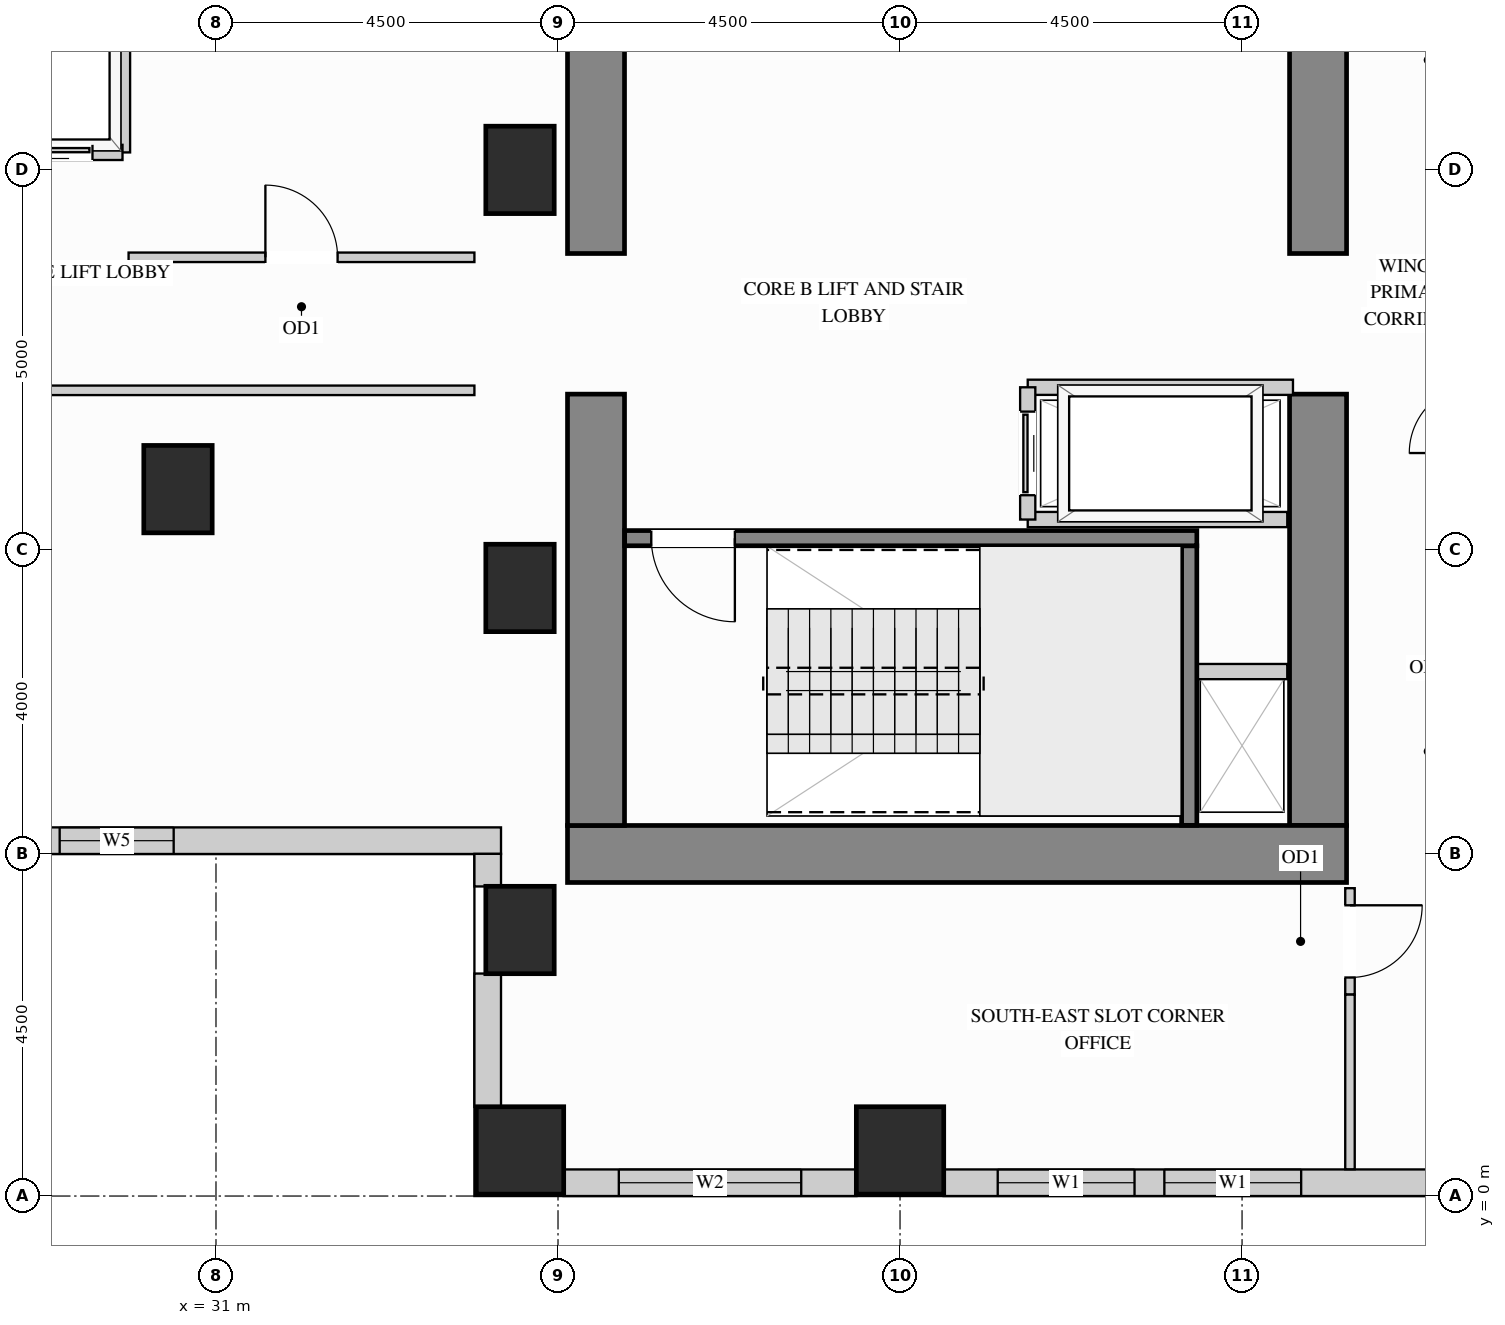
"""IFC4 building model, lengths in metres.
Left out: names, types, materials, properties, quantities, classifications, styles, units other than length and angle.
Written with IfcOpenShell. Run it as: python <this file> out.ifc"""

import sys

from ifc_helpers import new_model, si_unit, direction, frame, frame_2d, origin, origin_2d, place, context, subcontext, project, spatial, rectangle, extrude, source, transform, mapped, element, fill, save


model = new_model("IFC4")
c1 = context("Model", 3, precision=1e-05, world=origin(), true_north=direction((0.0, 1.0)))
c2 = subcontext(c1, "Body", "Model", "MODEL_VIEW")
j1 = project(units=[si_unit("LENGTHUNIT", "METRE"), si_unit("PLANEANGLEUNIT", "RADIAN")], contexts=[c1])
p1 = place(None, origin())
s1 = spatial("IfcSite", under=j1, at=p1, CompositionType="ELEMENT")
p2 = place(p1, origin())
s2 = spatial("IfcBuilding", under=s1, at=p2, CompositionType="ELEMENT")
p3 = place(p2, frame((0.0, 0.0, 81.0)))
s3 = spatial("IfcBuildingStorey", under=s2, at=p3, CompositionType="ELEMENT", Elevation=81.0)
m1 = source(origin(), c2, "Body", "SweptSolid", [
    extrude(rectangle(XDim=0.9, YDim=1.15, at=origin_2d()), origin(), (0.0, 0.0, 1.0), 3.38),
])
for number, where, z_axis, x_axis in (
    (1, (35.0, 13.5, 0.0), (0.0, 0.0, 1.0), (1.0, 0.0, 0.0)),
    (2, (35.0, 3.5, 0.0), (0.0, 0.0, 1.0), (1.0, 0.0, 0.0)),
    (3, (35.0, 8.0, 0.0), (0.0, 0.0, 1.0), (1.0, 0.0, 0.0)),
    (4, (30.5, 9.3, 0.0), (0.0, 0.0, 1.0), (1.0, 0.0, 0.0)),
):
    element("IfcColumn", number, at=place(p3, frame(where, z_axis=z_axis, x_axis=x_axis)), inside=s3, PredefinedType="COLUMN", context=c2, shape_type="MappedRepresentation", body=[
        mapped(m1, transform((0.0, 0.0, 0.0), x_axis=(1.0, 0.0, 0.0), y_axis=(0.0, 1.0, 0.0), z_axis=(0.0, 0.0, 1.0))),
    ])
m2 = source(origin(), c2, "Body", "SweptSolid", [
    extrude(rectangle(XDim=1.15, YDim=1.15, at=origin_2d()), origin(), (0.0, 0.0, 1.0), 3.38),
])
for number, where, z_axis, x_axis in (
    (5, (35.0, 0.6, 0.0), (0.0, 0.0, 1.0), (1.0, 0.0, 0.0)),
    (6, (40.0, 0.6, 0.0), (0.0, 0.0, 1.0), (1.0, 0.0, 0.0)),
):
    element("IfcColumn", number, at=place(p3, frame(where, z_axis=z_axis, x_axis=x_axis)), inside=s3, PredefinedType="COLUMN", context=c2, shape_type="MappedRepresentation", body=[
        mapped(m2, transform((0.0, 0.0, 0.0), x_axis=(1.0, 0.0, 0.0), y_axis=(0.0, 1.0, 0.0), z_axis=(0.0, 0.0, 1.0))),
    ])
m3 = source(origin(), c2, "Body", "SweptSolid", [
    extrude(rectangle(XDim=5.675, YDim=0.75, at=frame_2d((2.837, 0.0))), origin(), (0.0, 0.0, 1.0), 3.38),
])
p4 = place(p3, frame((45.5, 4.875, 0.0), z_axis=(0.0, 0.0, 1.0), x_axis=(0.0, 1.0, 0.0)))
e7 = element("IfcWall", 7, at=p4, inside=s3, PredefinedType="SHEAR", context=c2, shape_type="MappedRepresentation", body=[
    mapped(m3, transform((0.0, 0.0, 0.0), x_axis=(1.0, 0.0, 0.0), y_axis=(0.0, 1.0, 0.0), z_axis=(0.0, 0.0, 1.0))),
])
m4 = source(origin(), c2, "Body", "SweptSolid", [
    extrude(rectangle(XDim=3.725, YDim=0.75, at=frame_2d((1.863, 0.0))), origin(), (0.0, 0.0, 1.0), 3.38),
])
p5 = place(p3, frame((45.5, 12.4, 0.0), z_axis=(0.0, 0.0, 1.0), x_axis=(0.0, 1.0, 0.0)))
e8 = element("IfcWall", 8, at=p5, inside=s3, PredefinedType="SHEAR", context=c2, shape_type="MappedRepresentation", body=[
    mapped(m4, transform((0.0, 0.0, 0.0), x_axis=(1.0, 0.0, 0.0), y_axis=(0.0, 1.0, 0.0), z_axis=(0.0, 0.0, 1.0))),
])
m5 = source(origin(), c2, "Body", "SweptSolid", [
    extrude(rectangle(XDim=10.25, YDim=0.75, at=frame_2d((5.125, 0.0))), origin(), (0.0, 0.0, 1.0), 3.38),
])
p6 = place(p3, frame((35.625, 4.5, 0.0), z_axis=(0.0, 0.0, 1.0), x_axis=(1.0, 0.0, 0.0)))
e9 = element("IfcWall", 9, at=p6, inside=s3, PredefinedType="SHEAR", context=c2, shape_type="MappedRepresentation", body=[
    mapped(m5, transform((0.0, 0.0, 0.0), x_axis=(1.0, 0.0, 0.0), y_axis=(0.0, 1.0, 0.0), z_axis=(0.0, 0.0, 1.0))),
])
p7 = place(p3, frame((36.0, 4.875, 0.0), z_axis=(0.0, 0.0, 1.0), x_axis=(0.0, 1.0, 0.0)))
e10 = element("IfcWall", 10, at=p7, inside=s3, PredefinedType="SHEAR", context=c2, shape_type="MappedRepresentation", body=[
    mapped(m3, transform((0.0, 0.0, 0.0), x_axis=(1.0, 0.0, 0.0), y_axis=(0.0, 1.0, 0.0), z_axis=(0.0, 0.0, 1.0))),
])
p8 = place(p3, frame((36.0, 12.4, 0.0), z_axis=(0.0, 0.0, 1.0), x_axis=(0.0, 1.0, 0.0)))
e11 = element("IfcWall", 11, at=p8, inside=s3, PredefinedType="SHEAR", context=c2, shape_type="MappedRepresentation", body=[
    mapped(m4, transform((0.0, 0.0, 0.0), x_axis=(1.0, 0.0, 0.0), y_axis=(0.0, 1.0, 0.0), z_axis=(0.0, 0.0, 1.0))),
])
p9 = place(p3, frame((19.15, 4.675, 0.0), z_axis=(0.0, 0.0, 1.0), x_axis=(1.0, 0.0, 0.0)))
e12 = element("IfcWall", 12, at=p9, inside=s3, PredefinedType="SOLIDWALL", context=c2, shape_type="SweptSolid", body=[
    extrude(rectangle(XDim=15.6, YDim=0.35, at=frame_2d((7.8, 0.0))), origin(), (0.0, 0.0, 1.0), 3.365),
])
p10 = place(p9, frame((4.307, 0.0, 0.78)))
e13 = element("IfcOpeningElement", 13, at=p10, cuts=e12, PredefinedType="OPENING", context=c2, shape_type="SweptSolid", body=[
    extrude(rectangle(XDim=1.5, YDim=2.0, at=frame_2d((0.75, 1.0))), frame((0.0, 0.185, 0.0), z_axis=(0.0, -1.0, 0.0), x_axis=(1.0, 0.0, 0.0)), (0.0, 0.0, 1.0), 0.37),
])
p11 = place(p9, frame((9.793, 0.0, 0.78)))
e14 = element("IfcOpeningElement", 14, at=p11, cuts=e12, PredefinedType="OPENING", context=c2, shape_type="SweptSolid", body=[
    extrude(rectangle(XDim=1.5, YDim=2.0, at=frame_2d((0.75, 1.0))), frame((0.0, 0.185, 0.0), z_axis=(0.0, -1.0, 0.0), x_axis=(1.0, 0.0, 0.0)), (0.0, 0.0, 1.0), 0.37),
])
m6 = source(origin(), c2, "Body", "SweptSolid", [
    extrude(rectangle(XDim=0.429, YDim=0.35, at=frame_2d((0.214, 0.0))), origin(), (0.0, 0.0, 1.0), 3.365),
])
p12 = place(p3, frame((34.575, 4.502, 0.0), z_axis=(0.0, 0.0, 1.0), x_axis=(0.0, -1.0, 0.0)))
e15 = element("IfcWall", 15, at=p12, inside=s3, PredefinedType="SOLIDWALL", context=c2, shape_type="MappedRepresentation", body=[
    mapped(m6, transform((0.0, 0.0, 0.0), x_axis=(1.0, 0.0, 0.0), y_axis=(0.0, 1.0, 0.0), z_axis=(0.0, 0.0, 1.0))),
])
m7 = source(origin(), c2, "Body", "SweptSolid", [
    extrude(rectangle(XDim=1.754, YDim=0.35, at=frame_2d((0.877, 0.0))), origin(), (0.0, 0.0, 1.0), 3.365),
])
p13 = place(p3, frame((34.575, 2.927, 0.0), z_axis=(0.0, 0.0, 1.0), x_axis=(0.0, -1.0, 0.0)))
e16 = element("IfcWall", 16, at=p13, inside=s3, PredefinedType="SOLIDWALL", context=c2, shape_type="MappedRepresentation", body=[
    mapped(m7, transform((0.0, 0.0, 0.0), x_axis=(1.0, 0.0, 0.0), y_axis=(0.0, 1.0, 0.0), z_axis=(0.0, 0.0, 1.0))),
])
p14 = place(p3, frame((35.573, 0.175, 0.0), z_axis=(0.0, 0.0, 1.0), x_axis=(1.0, 0.0, 0.0)))
e17 = element("IfcWall", 17, at=p14, inside=s3, PredefinedType="SOLIDWALL", context=c2, shape_type="SweptSolid", body=[
    extrude(rectangle(XDim=3.854, YDim=0.35, at=frame_2d((1.927, 0.0))), origin(), (0.0, 0.0, 1.0), 3.365),
])
p15 = place(p14, frame((0.727, 0.0, 0.78)))
e18 = element("IfcOpeningElement", 18, at=p15, cuts=e17, PredefinedType="OPENING", context=c2, shape_type="SweptSolid", body=[
    extrude(rectangle(XDim=2.4, YDim=2.1, at=frame_2d((1.2, 1.05))), frame((0.0, 0.185, 0.0), z_axis=(0.0, -1.0, 0.0), x_axis=(1.0, 0.0, 0.0)), (0.0, 0.0, 1.0), 0.37),
])
p16 = place(p3, frame((40.573, 0.175, 0.0), z_axis=(0.0, 0.0, 1.0), x_axis=(1.0, 0.0, 0.0)))
e19 = element("IfcWall", 19, at=p16, inside=s3, PredefinedType="SOLIDWALL", context=c2, shape_type="SweptSolid", body=[
    extrude(rectangle(XDim=6.454, YDim=0.35, at=frame_2d((3.227, 0.0))), origin(), (0.0, 0.0, 1.0), 3.365),
])
p17 = place(p16, frame((0.712, 0.0, 0.78)))
e20 = element("IfcOpeningElement", 20, at=p17, cuts=e19, PredefinedType="OPENING", context=c2, shape_type="SweptSolid", body=[
    extrude(rectangle(XDim=1.8, YDim=2.1, at=frame_2d((0.9, 1.05))), frame((0.0, 0.185, 0.0), z_axis=(0.0, -1.0, 0.0), x_axis=(1.0, 0.0, 0.0)), (0.0, 0.0, 1.0), 0.37),
])
p18 = place(p16, frame((2.905, 0.0, 0.78)))
e21 = element("IfcOpeningElement", 21, at=p18, cuts=e19, PredefinedType="OPENING", context=c2, shape_type="SweptSolid", body=[
    extrude(rectangle(XDim=1.8, YDim=2.1, at=frame_2d((0.9, 1.05))), frame((0.0, 0.185, 0.0), z_axis=(0.0, -1.0, 0.0), x_axis=(1.0, 0.0, 0.0)), (0.0, 0.0, 1.0), 0.37),
])
p19 = place(p3, frame((45.92, 2.65, 0.0), z_axis=(0.0, 0.0, 1.0), x_axis=(0.0, 1.0, 0.0)))
e22 = element("IfcWall", 22, at=p19, inside=s3, PredefinedType="PARTITIONING", context=c2, shape_type="SweptSolid", body=[
    extrude(rectangle(XDim=1.4, YDim=0.125, at=frame_2d((0.7, 0.0))), origin(), (0.0, 0.0, 1.0), 3.365),
])
p20 = place(p19, frame((0.225, 0.0, 0.0)))
e23 = element("IfcOpeningElement", 23, at=p20, cuts=e22, PredefinedType="OPENING", context=c2, shape_type="SweptSolid", body=[
    extrude(rectangle(XDim=0.95, YDim=2.15, at=frame_2d((0.475, 1.075))), frame((0.0, 0.073, 0.0), z_axis=(0.0, -1.0, 0.0), x_axis=(1.0, 0.0, 0.0)), (0.0, 0.0, 1.0), 0.145),
])
m8 = source(origin(), c2, "Body", "SweptSolid", [
    extrude(rectangle(XDim=2.298, YDim=0.125, at=frame_2d((1.149, 0.0))), origin(), (0.0, 0.0, 1.0), 3.365),
])
p21 = place(p3, frame((45.92, 0.352, 0.0), z_axis=(0.0, 0.0, 1.0), x_axis=(0.0, 1.0, 0.0)))
e24 = element("IfcWall", 24, at=p21, inside=s3, PredefinedType="PARTITIONING", context=c2, shape_type="MappedRepresentation", body=[
    mapped(m8, transform((0.0, 0.0, 0.0), x_axis=(1.0, 0.0, 0.0), y_axis=(0.0, 1.0, 0.0), z_axis=(0.0, 0.0, 1.0))),
])
p22 = place(p3, frame((29.85, 12.35, 0.0), z_axis=(0.0, 0.0, 1.0), x_axis=(1.0, 0.0, 0.0)))
e25 = element("IfcWall", 25, at=p22, inside=s3, PredefinedType="PARTITIONING", context=c2, shape_type="SweptSolid", body=[
    extrude(rectangle(XDim=4.55, YDim=0.125, at=frame_2d((2.275, 0.0))), origin(), (0.0, 0.0, 1.0), 3.365),
])
p23 = place(p22, frame((1.8, 0.0, 0.0)))
e26 = element("IfcOpeningElement", 26, at=p23, cuts=e25, PredefinedType="OPENING", context=c2, shape_type="SweptSolid", body=[
    extrude(rectangle(XDim=0.95, YDim=2.15, at=frame_2d((0.475, 1.075))), frame((0.0, 0.073, 0.0), z_axis=(0.0, -1.0, 0.0), x_axis=(1.0, 0.0, 0.0)), (0.0, 0.0, 1.0), 0.145),
])
p24 = place(p3, frame((19.5, 10.6, 0.0), z_axis=(0.0, 0.0, 1.0), x_axis=(1.0, 0.0, 0.0)))
e27 = element("IfcWall", 27, at=p24, inside=s3, PredefinedType="PARTITIONING", context=c2, shape_type="SweptSolid", body=[
    extrude(rectangle(XDim=14.9, YDim=0.125, at=frame_2d((7.45, 0.0))), origin(), (0.0, 0.0, 1.0), 3.365),
])
p25 = place(p24, frame((6.975, 0.0, 0.0)))
e28 = element("IfcOpeningElement", 28, at=p25, cuts=e27, PredefinedType="OPENING", context=c2, shape_type="SweptSolid", body=[
    extrude(rectangle(XDim=0.95, YDim=2.15, at=frame_2d((0.475, 1.075))), frame((0.0, 0.073, 0.0), z_axis=(0.0, -1.0, 0.0), x_axis=(1.0, 0.0, 0.0)), (0.0, 0.0, 1.0), 0.145),
])
m9 = source(origin(), c2, "Body", "SweptSolid", [
    extrude(rectangle(XDim=1.245, YDim=0.2, at=frame_2d((0.623, 0.0))), origin(), (0.0, 0.0, 1.0), 3.365),
])
p26 = place(p3, frame((43.85, 6.9, 0.0), z_axis=(0.0, 0.0, 1.0), x_axis=(1.0, 0.0, 0.0)))
e29 = element("IfcWall", 29, at=p26, inside=s3, PredefinedType="PARTITIONING", context=c2, shape_type="MappedRepresentation", body=[
    mapped(m9, transform((0.0, 0.0, 0.0), x_axis=(1.0, 0.0, 0.0), y_axis=(0.0, 1.0, 0.0), z_axis=(0.0, 0.0, 1.0))),
])
m10 = source(origin(), c2, "Body", "SweptSolid", [
    extrude(rectangle(XDim=2.29, YDim=0.2, at=frame_2d((1.145, 0.0))), origin(), (0.0, 0.0, 1.0), 3.365),
])
p27 = place(p3, frame((29.77, 13.73, 0.0), z_axis=(0.0, 0.0, 1.0), x_axis=(0.0, 1.0, 0.0)))
e30 = element("IfcWall", 30, at=p27, inside=s3, PredefinedType="PARTITIONING", context=c2, shape_type="MappedRepresentation", body=[
    mapped(m10, transform((0.0, 0.0, 0.0), x_axis=(1.0, 0.0, 0.0), y_axis=(0.0, 1.0, 0.0), z_axis=(0.0, 0.0, 1.0))),
])
p28 = place(p3, frame((27.88, 13.73, 0.0), z_axis=(0.0, 0.0, 1.0), x_axis=(1.0, 0.0, 0.0)))
e31 = element("IfcWall", 31, at=p28, inside=s3, PredefinedType="PARTITIONING", context=c2, shape_type="SweptSolid", body=[
    extrude(rectangle(XDim=1.89, YDim=0.2, at=frame_2d((0.945, 0.0))), origin(), (0.0, 0.0, 1.0), 2.446),
])
p29 = place(p28, frame((0.395, 0.0, 0.0)))
e32 = element("IfcOpeningElement", 32, at=p29, cuts=e31, PredefinedType="OPENING", context=c2, shape_type="SweptSolid", body=[
    extrude(rectangle(XDim=1.1, YDim=2.2, at=frame_2d((0.55, 1.1))), frame((0.0, 0.11, 0.0), z_axis=(0.0, -1.0, 0.0), x_axis=(1.0, 0.0, 0.0)), (0.0, 0.0, 1.0), 0.22),
])
m11 = source(origin(), c2, "Body", "SweptSolid", [
    extrude(rectangle(XDim=3.49, YDim=0.2, at=frame_2d((1.745, 0.0))), origin(), (0.0, 0.0, 1.0), 3.365),
])
p30 = place(p3, frame((41.68, 10.64, 0.0), z_axis=(0.0, 0.0, 1.0), x_axis=(1.0, 0.0, 0.0)))
e33 = element("IfcWall", 33, at=p30, inside=s3, PredefinedType="PARTITIONING", context=c2, shape_type="MappedRepresentation", body=[
    mapped(m11, transform((0.0, 0.0, 0.0), x_axis=(1.0, 0.0, 0.0), y_axis=(0.0, 1.0, 0.0), z_axis=(0.0, 0.0, 1.0))),
])
m12 = source(origin(), c2, "Body", "SweptSolid", [
    extrude(rectangle(XDim=3.415, YDim=0.2, at=frame_2d((1.708, 0.0))), origin(), (0.0, 0.0, 1.0), 3.365),
])
p31 = place(p3, frame((41.68, 8.9, 0.0), z_axis=(0.0, 0.0, 1.0), x_axis=(1.0, 0.0, 0.0)))
e34 = element("IfcWall", 34, at=p31, inside=s3, PredefinedType="PARTITIONING", context=c2, shape_type="MappedRepresentation", body=[
    mapped(m12, transform((0.0, 0.0, 0.0), x_axis=(1.0, 0.0, 0.0), y_axis=(0.0, 1.0, 0.0), z_axis=(0.0, 0.0, 1.0))),
])
p32 = place(p3, frame((41.68, 8.9, 0.0), z_axis=(0.0, 0.0, 1.0), x_axis=(0.0, 1.0, 0.0)))
e35 = element("IfcWall", 35, at=p32, inside=s3, PredefinedType="PARTITIONING", context=c2, shape_type="SweptSolid", body=[
    extrude(rectangle(XDim=1.74, YDim=0.2, at=frame_2d((0.87, 0.0))), origin(), (0.0, 0.0, 1.0), 3.365),
])
p33 = place(p32, frame((0.32, 0.0, 0.0)))
e36 = element("IfcOpeningElement", 36, at=p33, cuts=e35, PredefinedType="OPENING", context=c2, shape_type="SweptSolid", body=[
    extrude(rectangle(XDim=1.1, YDim=2.2, at=frame_2d((0.55, 1.1))), frame((0.0, 0.11, 0.0), z_axis=(0.0, -1.0, 0.0), x_axis=(1.0, 0.0, 0.0)), (0.0, 0.0, 1.0), 0.22),
])
m13 = source(origin(), c2, "Body", "SweptSolid", [
    extrude(rectangle(XDim=3.678, YDim=0.2, at=frame_2d((1.839, 0.0))), origin(), (0.0, 0.0, 1.0), 3.38),
])
p34 = place(p3, frame((43.805, 4.877, 0.0), z_axis=(0.0, 0.0, 1.0), x_axis=(0.0, 1.0, 0.0)))
e37 = element("IfcWall", 37, at=p34, inside=s3, PredefinedType="SHEAR", context=c2, shape_type="MappedRepresentation", body=[
    mapped(m13, transform((0.0, 0.0, 0.0), x_axis=(1.0, 0.0, 0.0), y_axis=(0.0, 1.0, 0.0), z_axis=(0.0, 0.0, 1.0))),
])
p35 = place(p3, frame((36.377, 8.655, 0.0), z_axis=(0.0, 0.0, 1.0), x_axis=(1.0, 0.0, 0.0)))
e38 = element("IfcWall", 38, at=p35, inside=s3, PredefinedType="SHEAR", context=c2, shape_type="SweptSolid", body=[
    extrude(rectangle(XDim=7.528, YDim=0.2, at=frame_2d((3.764, 0.0))), origin(), (0.0, 0.0, 1.0), 3.38),
])
p36 = place(p35, frame((0.35, 0.0, 0.0)))
e39 = element("IfcOpeningElement", 39, at=p36, cuts=e38, PredefinedType="OPENING", context=c2, shape_type="SweptSolid", body=[
    extrude(rectangle(XDim=1.1, YDim=2.15, at=frame_2d((0.55, 1.075))), frame((0.0, 0.11, 0.0), z_axis=(0.0, -1.0, 0.0), x_axis=(1.0, 0.0, 0.0)), (0.0, 0.0, 1.0), 0.22),
])
m14 = source(origin(), c2, "Body", "SweptSolid", [
    extrude(rectangle(XDim=1.1, YDim=2.2, at=frame_2d((0.55, 1.1))), frame((0.0, 0.025, 0.0), z_axis=(0.0, -1.0, 0.0), x_axis=(1.0, 0.0, 0.0)), (0.0, 0.0, 1.0), 0.05),
])
p37 = place(p29, origin())
e40 = element("IfcDoor", 40, at=p37, inside=s3, OperationType="SLIDING_TO_LEFT", PredefinedType="DOOR", context=c2, shape_type="MappedRepresentation", body=[
    mapped(m14, transform((0.0, 0.0, 0.0), x_axis=(1.0, 0.0, 0.0), y_axis=(0.0, 1.0, 0.0), z_axis=(0.0, 0.0, 1.0))),
])
fill(e32, e40)
p38 = place(p33, origin())
e41 = element("IfcDoor", 41, at=p38, inside=s3, OperationType="SLIDING_TO_LEFT", PredefinedType="DOOR", context=c2, shape_type="MappedRepresentation", body=[
    mapped(m14, transform((0.0, 0.0, 0.0), x_axis=(1.0, 0.0, 0.0), y_axis=(0.0, 1.0, 0.0), z_axis=(0.0, 0.0, 1.0))),
])
fill(e36, e41)
m15 = source(origin(), c2, "Body", "SweptSolid", [
    extrude(rectangle(XDim=0.95, YDim=2.15, at=frame_2d((0.475, 1.075))), frame((0.0, 0.025, 0.0), z_axis=(0.0, -1.0, 0.0), x_axis=(1.0, 0.0, 0.0)), (0.0, 0.0, 1.0), 0.05),
])
p39 = place(p20, origin())
e42 = element("IfcDoor", 42, at=p39, inside=s3, OperationType="SINGLE_SWING_RIGHT", PredefinedType="DOOR", context=c2, shape_type="MappedRepresentation", body=[
    mapped(m15, transform((0.0, 0.0, 0.0), x_axis=(1.0, 0.0, 0.0), y_axis=(0.0, 1.0, 0.0), z_axis=(0.0, 0.0, 1.0))),
])
fill(e23, e42)
p40 = place(p23, origin())
e43 = element("IfcDoor", 43, at=p40, inside=s3, OperationType="SINGLE_SWING_LEFT", PredefinedType="DOOR", context=c2, shape_type="MappedRepresentation", body=[
    mapped(m15, transform((0.0, 0.0, 0.0), x_axis=(1.0, 0.0, 0.0), y_axis=(0.0, 1.0, 0.0), z_axis=(0.0, 0.0, 1.0))),
])
fill(e26, e43)
m16 = source(origin(), c2, "Body", "SweptSolid", [
    extrude(rectangle(XDim=1.1, YDim=2.15, at=frame_2d((0.55, 1.075))), frame((0.0, 0.025, 0.0), z_axis=(0.0, -1.0, 0.0), x_axis=(1.0, 0.0, 0.0)), (0.0, 0.0, 1.0), 0.05),
])
p41 = place(p36, origin())
e44 = element("IfcDoor", 44, at=p41, inside=s3, OperationType="SINGLE_SWING_RIGHT", PredefinedType="DOOR", context=c2, shape_type="MappedRepresentation", body=[
    mapped(m16, transform((0.0, 0.0, 0.0), x_axis=(1.0, 0.0, 0.0), y_axis=(0.0, 1.0, 0.0), z_axis=(0.0, 0.0, 1.0))),
])
fill(e39, e44)
m17 = source(origin(), c2, "Body", "SweptSolid", [
    extrude(rectangle(XDim=1.8, YDim=2.1, at=frame_2d((0.9, 1.05))), frame((0.0, 0.03, 0.0), z_axis=(0.0, -1.0, 0.0), x_axis=(1.0, 0.0, 0.0)), (0.0, 0.0, 1.0), 0.06),
])
p42 = place(p17, origin())
e45 = element("IfcWindow", 45, at=p42, inside=s3, PartitioningType="SINGLE_PANEL", PredefinedType="WINDOW", context=c2, shape_type="MappedRepresentation", body=[
    mapped(m17, transform((0.0, 0.0, 0.0), x_axis=(1.0, 0.0, 0.0), y_axis=(0.0, 1.0, 0.0), z_axis=(0.0, 0.0, 1.0))),
])
fill(e20, e45)
p43 = place(p18, origin())
e46 = element("IfcWindow", 46, at=p43, inside=s3, PartitioningType="SINGLE_PANEL", PredefinedType="WINDOW", context=c2, shape_type="MappedRepresentation", body=[
    mapped(m17, transform((0.0, 0.0, 0.0), x_axis=(1.0, 0.0, 0.0), y_axis=(0.0, 1.0, 0.0), z_axis=(0.0, 0.0, 1.0))),
])
fill(e21, e46)
m18 = source(origin(), c2, "Body", "SweptSolid", [
    extrude(rectangle(XDim=2.4, YDim=2.1, at=frame_2d((1.2, 1.05))), frame((0.0, 0.03, 0.0), z_axis=(0.0, -1.0, 0.0), x_axis=(1.0, 0.0, 0.0)), (0.0, 0.0, 1.0), 0.06),
])
p44 = place(p15, origin())
e47 = element("IfcWindow", 47, at=p44, inside=s3, PartitioningType="SINGLE_PANEL", PredefinedType="WINDOW", context=c2, shape_type="MappedRepresentation", body=[
    mapped(m18, transform((0.0, 0.0, 0.0), x_axis=(1.0, 0.0, 0.0), y_axis=(0.0, 1.0, 0.0), z_axis=(0.0, 0.0, 1.0))),
])
fill(e18, e47)
m19 = source(origin(), c2, "Body", "SweptSolid", [
    extrude(rectangle(XDim=1.5, YDim=2.0, at=frame_2d((0.75, 1.0))), frame((0.0, 0.03, 0.0), z_axis=(0.0, -1.0, 0.0), x_axis=(1.0, 0.0, 0.0)), (0.0, 0.0, 1.0), 0.06),
])
p45 = place(p11, origin())
e48 = element("IfcWindow", 48, at=p45, inside=s3, PartitioningType="SINGLE_PANEL", PredefinedType="WINDOW", context=c2, shape_type="MappedRepresentation", body=[
    mapped(m19, transform((0.0, 0.0, 0.0), x_axis=(1.0, 0.0, 0.0), y_axis=(0.0, 1.0, 0.0), z_axis=(0.0, 0.0, 1.0))),
])
fill(e14, e48)
save(model, sys.argv[1])
